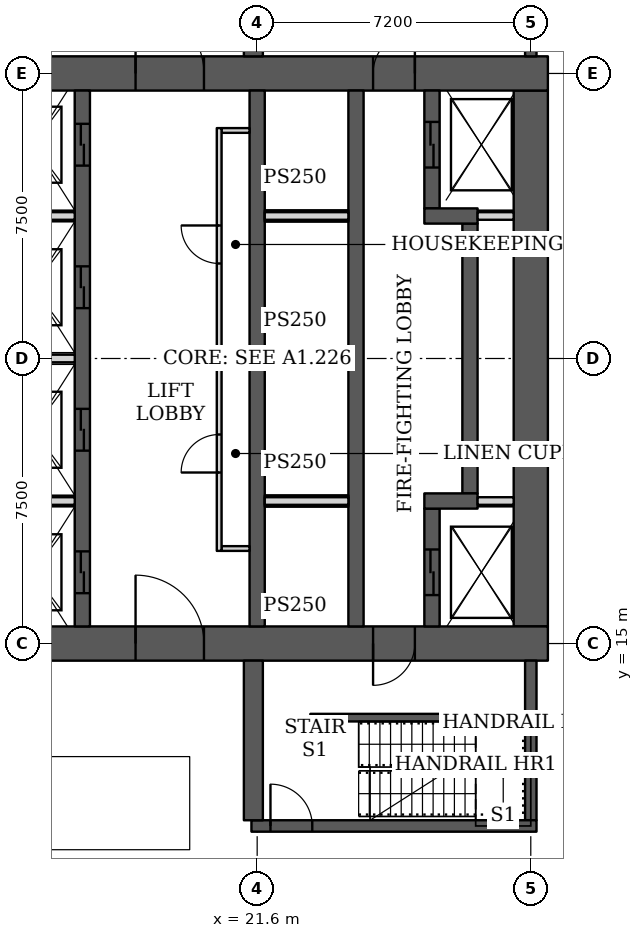
"""IFC4 building model, lengths in metres.
Left out: names, types, materials, properties, quantities, classifications, styles, units other than length and angle.
Written with IfcOpenShell. Run it as: python <this file> out.ifc"""

import sys

from ifc_helpers import new_model, si_unit, direction, frame, frame_2d, origin, place, context, subcontext, project, spatial, rectangle, extrude, element, fill, save


model = new_model("IFC4")
c1 = context("Model", 3, precision=1e-05, world=origin(), true_north=direction((0.0, 1.0)))
c2 = subcontext(c1, "Body", "Model", "MODEL_VIEW")
j1 = project(units=[si_unit("LENGTHUNIT", "METRE"), si_unit("PLANEANGLEUNIT", "RADIAN")], contexts=[c1])
p1 = place(None, origin())
s1 = spatial("IfcSite", under=j1, at=p1, CompositionType="ELEMENT")
p2 = place(p1, origin())
s2 = spatial("IfcBuilding", under=s1, at=p2, CompositionType="ELEMENT")
p3 = place(p2, frame((0.0, 0.0, -4.0)))
s3 = spatial("IfcBuildingStorey", under=s2, at=p3, CompositionType="ELEMENT", Elevation=-4.0)
p4 = place(p3, frame((13.95, 15.0, 0.0), z_axis=(0.0, 0.0, 1.0), x_axis=(1.0, 0.0, 0.0)))
e1 = element("IfcWall", 1, at=p4, inside=s3, PredefinedType="SHEAR", context=c2, shape_type="SweptSolid", body=[
    extrude(rectangle(XDim=15.3, YDim=0.9, at=frame_2d((7.65, 0.0))), origin(), (0.0, 0.0, 1.0), 4.0),
])
p5 = place(p4, frame((4.45, 0.0, 0.0)))
e2 = element("IfcOpeningElement", 2, at=p5, cuts=e1, PredefinedType="OPENING", context=c2, shape_type="SweptSolid", body=[
    extrude(rectangle(XDim=1.8, YDim=2.1, at=frame_2d((0.9, 1.05))), frame((0.0, 0.46, 0.0), z_axis=(0.0, -1.0, 0.0), x_axis=(1.0, 0.0, 0.0)), (0.0, 0.0, 1.0), 0.92),
])
p6 = place(p4, frame((10.7, 0.0, 0.0)))
e3 = element("IfcOpeningElement", 3, at=p6, cuts=e1, PredefinedType="OPENING", context=c2, shape_type="SweptSolid", body=[
    extrude(rectangle(XDim=1.1, YDim=2.1, at=frame_2d((0.55, 1.05))), frame((0.0, 0.46, 0.0), z_axis=(0.0, -1.0, 0.0), x_axis=(1.0, 0.0, 0.0)), (0.0, 0.0, 1.0), 0.92),
])
p7 = place(p3, frame((13.95, 30.0, 0.0), z_axis=(0.0, 0.0, 1.0), x_axis=(1.0, 0.0, 0.0)))
e4 = element("IfcWall", 4, at=p7, inside=s3, PredefinedType="SHEAR", context=c2, shape_type="SweptSolid", body=[
    extrude(rectangle(XDim=15.3, YDim=0.9, at=frame_2d((7.65, 0.0))), origin(), (0.0, 0.0, 1.0), 4.0),
])
p8 = place(p7, frame((4.45, 0.0, 0.0)))
e5 = element("IfcOpeningElement", 5, at=p8, cuts=e4, PredefinedType="OPENING", context=c2, shape_type="SweptSolid", body=[
    extrude(rectangle(XDim=1.8, YDim=2.1, at=frame_2d((0.9, 1.05))), frame((0.0, 0.46, 0.0), z_axis=(0.0, -1.0, 0.0), x_axis=(1.0, 0.0, 0.0)), (0.0, 0.0, 1.0), 0.92),
])
p9 = place(p7, frame((10.7, 0.0, 0.0)))
e6 = element("IfcOpeningElement", 6, at=p9, cuts=e4, PredefinedType="OPENING", context=c2, shape_type="SweptSolid", body=[
    extrude(rectangle(XDim=1.1, YDim=2.1, at=frame_2d((0.55, 1.05))), frame((0.0, 0.46, 0.0), z_axis=(0.0, -1.0, 0.0), x_axis=(1.0, 0.0, 0.0)), (0.0, 0.0, 1.0), 0.92),
])
p10 = place(p3, frame((28.8, 15.45, 0.0), z_axis=(0.0, 0.0, 1.0), x_axis=(0.0, 1.0, 0.0)))
e7 = element("IfcWall", 7, at=p10, inside=s3, PredefinedType="SHEAR", context=c2, shape_type="SweptSolid", body=[
    extrude(rectangle(XDim=14.1, YDim=0.9, at=frame_2d((7.05, 0.0))), origin(), (0.0, 0.0, 1.0), 4.0),
])
p11 = place(p3, frame((17.0, 15.45, 0.0), z_axis=(0.0, 0.0, 1.0), x_axis=(0.0, 1.0, 0.0)))
e8 = element("IfcWall", 8, at=p11, inside=s3, PredefinedType="SHEAR", context=c2, shape_type="SweptSolid", body=[
    extrude(rectangle(XDim=14.1, YDim=0.4, at=frame_2d((7.05, 0.0))), origin(), (0.0, 0.0, 1.0), 4.0),
])
p12 = place(p11, frame((0.875, 0.0, 0.0)))
e9 = element("IfcOpeningElement", 9, at=p12, cuts=e8, PredefinedType="OPENING", context=c2, shape_type="SweptSolid", body=[
    extrude(rectangle(XDim=1.1, YDim=2.1, at=frame_2d((0.55, 1.05))), frame((0.0, 0.21, 0.0), z_axis=(0.0, -1.0, 0.0), x_axis=(1.0, 0.0, 0.0)), (0.0, 0.0, 1.0), 0.42),
])
p13 = place(p11, frame((4.625, 0.0, 0.0)))
e10 = element("IfcOpeningElement", 10, at=p13, cuts=e8, PredefinedType="OPENING", context=c2, shape_type="SweptSolid", body=[
    extrude(rectangle(XDim=1.1, YDim=2.1, at=frame_2d((0.55, 1.05))), frame((0.0, 0.21, 0.0), z_axis=(0.0, -1.0, 0.0), x_axis=(1.0, 0.0, 0.0)), (0.0, 0.0, 1.0), 0.42),
])
p14 = place(p11, frame((8.375, 0.0, 0.0)))
e11 = element("IfcOpeningElement", 11, at=p14, cuts=e8, PredefinedType="OPENING", context=c2, shape_type="SweptSolid", body=[
    extrude(rectangle(XDim=1.1, YDim=2.1, at=frame_2d((0.55, 1.05))), frame((0.0, 0.21, 0.0), z_axis=(0.0, -1.0, 0.0), x_axis=(1.0, 0.0, 0.0)), (0.0, 0.0, 1.0), 0.42),
])
p15 = place(p11, frame((12.125, 0.0, 0.0)))
e12 = element("IfcOpeningElement", 12, at=p15, cuts=e8, PredefinedType="OPENING", context=c2, shape_type="SweptSolid", body=[
    extrude(rectangle(XDim=1.1, YDim=2.1, at=frame_2d((0.55, 1.05))), frame((0.0, 0.21, 0.0), z_axis=(0.0, -1.0, 0.0), x_axis=(1.0, 0.0, 0.0)), (0.0, 0.0, 1.0), 0.42),
])
for number, where, z_axis, x_axis in (
    (13, (21.6, 15.45, 0.0), (0.0, 0.0, 1.0), (0.0, 1.0, 0.0)),
    (14, (24.2, 15.45, 0.0), (0.0, 0.0, 1.0), (0.0, 1.0, 0.0)),
):
    element("IfcWall", number, at=place(p3, frame(where, z_axis=z_axis, x_axis=x_axis)), inside=s3, PredefinedType="SHEAR", context=c2, shape_type="SweptSolid", body=[
        extrude(rectangle(XDim=14.1, YDim=0.4, at=frame_2d((7.05, 0.0))), origin(), (0.0, 0.0, 1.0), 4.0),
    ])
p16 = place(p3, frame((26.2, 15.45, 0.0), z_axis=(0.0, 0.0, 1.0), x_axis=(0.0, 1.0, 0.0)))
e15 = element("IfcWall", 15, at=p16, inside=s3, PredefinedType="SHEAR", context=c2, shape_type="SweptSolid", body=[
    extrude(rectangle(XDim=3.1, YDim=0.4, at=frame_2d((1.55, 0.0))), origin(), (0.0, 0.0, 1.0), 4.0),
])
p17 = place(p16, frame((0.825, 0.0, 0.0)))
e16 = element("IfcOpeningElement", 16, at=p17, cuts=e15, PredefinedType="OPENING", context=c2, shape_type="SweptSolid", body=[
    extrude(rectangle(XDim=1.2, YDim=2.1, at=frame_2d((0.6, 1.05))), frame((0.0, 0.21, 0.0), z_axis=(0.0, -1.0, 0.0), x_axis=(1.0, 0.0, 0.0)), (0.0, 0.0, 1.0), 0.42),
])
p18 = place(p3, frame((26.0, 18.75, 0.0), z_axis=(0.0, 0.0, 1.0), x_axis=(1.0, 0.0, 0.0)))
e17 = element("IfcWall", 17, at=p18, inside=s3, PredefinedType="SHEAR", context=c2, shape_type="SweptSolid", body=[
    extrude(rectangle(XDim=1.4, YDim=0.4, at=frame_2d((0.7, 0.0))), origin(), (0.0, 0.0, 1.0), 4.0),
])
p19 = place(p3, frame((27.2, 18.95, 0.0), z_axis=(0.0, 0.0, 1.0), x_axis=(0.0, 1.0, 0.0)))
e18 = element("IfcWall", 18, at=p19, inside=s3, PredefinedType="SHEAR", context=c2, shape_type="SweptSolid", body=[
    extrude(rectangle(XDim=7.1, YDim=0.4, at=frame_2d((3.55, 0.0))), origin(), (0.0, 0.0, 1.0), 4.0),
])
p20 = place(p3, frame((26.0, 26.25, 0.0), z_axis=(0.0, 0.0, 1.0), x_axis=(1.0, 0.0, 0.0)))
e19 = element("IfcWall", 19, at=p20, inside=s3, PredefinedType="SHEAR", context=c2, shape_type="SweptSolid", body=[
    extrude(rectangle(XDim=1.4, YDim=0.4, at=frame_2d((0.7, 0.0))), origin(), (0.0, 0.0, 1.0), 4.0),
])
p21 = place(p3, frame((26.2, 26.45, 0.0), z_axis=(0.0, 0.0, 1.0), x_axis=(0.0, 1.0, 0.0)))
e20 = element("IfcWall", 20, at=p21, inside=s3, PredefinedType="SHEAR", context=c2, shape_type="SweptSolid", body=[
    extrude(rectangle(XDim=3.1, YDim=0.4, at=frame_2d((1.55, 0.0))), origin(), (0.0, 0.0, 1.0), 4.0),
])
p22 = place(p21, frame((1.075, 0.0, 0.0)))
e21 = element("IfcOpeningElement", 21, at=p22, cuts=e20, PredefinedType="OPENING", context=c2, shape_type="SweptSolid", body=[
    extrude(rectangle(XDim=1.2, YDim=2.1, at=frame_2d((0.6, 1.05))), frame((0.0, 0.21, 0.0), z_axis=(0.0, -1.0, 0.0), x_axis=(1.0, 0.0, 0.0)), (0.0, 0.0, 1.0), 0.42),
])
p23 = place(p3, frame((21.45, 10.2, 0.0), z_axis=(0.0, 0.0, 1.0), x_axis=(1.0, 0.0, 0.0)))
e22 = element("IfcWall", 22, at=p23, inside=s3, PredefinedType="SHEAR", context=c2, shape_type="SweptSolid", body=[
    extrude(rectangle(XDim=7.5, YDim=0.3, at=frame_2d((3.75, 0.0))), origin(), (0.0, 0.0, 1.0), 4.0),
])
p24 = place(p23, frame((0.5, 0.0, 0.0)))
e23 = element("IfcOpeningElement", 23, at=p24, cuts=e22, PredefinedType="OPENING", context=c2, shape_type="SweptSolid", body=[
    extrude(rectangle(XDim=1.1, YDim=2.1, at=frame_2d((0.55, 1.05))), frame((0.0, 0.16, 0.0), z_axis=(0.0, -1.0, 0.0), x_axis=(1.0, 0.0, 0.0)), (0.0, 0.0, 1.0), 0.32),
])
p25 = place(p3, frame((21.5, 10.35, 0.0), z_axis=(0.0, 0.0, 1.0), x_axis=(0.0, 1.0, 0.0)))
e24 = element("IfcWall", 24, at=p25, inside=s3, PredefinedType="SHEAR", context=c2, shape_type="SweptSolid", body=[
    extrude(rectangle(XDim=4.2, YDim=0.5, at=frame_2d((2.1, 0.0))), origin(), (0.0, 0.0, 1.0), 4.0),
])
p26 = place(p3, frame((28.8, 10.35, 0.0), z_axis=(0.0, 0.0, 1.0), x_axis=(0.0, 1.0, 0.0)))
e25 = element("IfcWall", 25, at=p26, inside=s3, PredefinedType="SHEAR", context=c2, shape_type="SweptSolid", body=[
    extrude(rectangle(XDim=4.2, YDim=0.3, at=frame_2d((2.1, 0.0))), origin(), (0.0, 0.0, 1.0), 4.0),
])
p27 = place(p3, frame((21.5, 30.45, 0.0), z_axis=(0.0, 0.0, 1.0), x_axis=(0.0, 1.0, 0.0)))
e26 = element("IfcWall", 26, at=p27, inside=s3, PredefinedType="SHEAR", context=c2, shape_type="SweptSolid", body=[
    extrude(rectangle(XDim=4.2, YDim=0.5, at=frame_2d((2.1, 0.0))), origin(), (0.0, 0.0, 1.0), 4.0),
])
p28 = place(p3, frame((28.8, 30.45, 0.0), z_axis=(0.0, 0.0, 1.0), x_axis=(0.0, 1.0, 0.0)))
e27 = element("IfcWall", 27, at=p28, inside=s3, PredefinedType="SHEAR", context=c2, shape_type="SweptSolid", body=[
    extrude(rectangle(XDim=4.2, YDim=0.3, at=frame_2d((2.1, 0.0))), origin(), (0.0, 0.0, 1.0), 4.0),
])
p29 = place(p3, frame((20.6, 17.438, 0.0), z_axis=(0.0, 0.0, 1.0), x_axis=(0.0, 1.0, 0.0)))
e28 = element("IfcWall", 28, at=p29, inside=s3, PredefinedType="PARTITIONING", context=c2, shape_type="SweptSolid", body=[
    extrude(rectangle(XDim=11.124, YDim=0.125, at=frame_2d((5.562, 0.0))), origin(), (0.0, 0.0, 1.0), 3.7),
])
p30 = place(p29, frame((2.062, 0.0, 0.0)))
e29 = element("IfcOpeningElement", 29, at=p30, cuts=e28, PredefinedType="OPENING", context=c2, shape_type="SweptSolid", body=[
    extrude(rectangle(XDim=1.0, YDim=2.1, at=frame_2d((0.5, 1.05))), frame((0.0, 0.073, 0.0), z_axis=(0.0, -1.0, 0.0), x_axis=(1.0, 0.0, 0.0)), (0.0, 0.0, 1.0), 0.145),
])
p31 = place(p29, frame((7.562, 0.0, 0.0)))
e30 = element("IfcOpeningElement", 30, at=p31, cuts=e28, PredefinedType="OPENING", context=c2, shape_type="SweptSolid", body=[
    extrude(rectangle(XDim=1.0, YDim=2.1, at=frame_2d((0.5, 1.05))), frame((0.0, 0.073, 0.0), z_axis=(0.0, -1.0, 0.0), x_axis=(1.0, 0.0, 0.0)), (0.0, 0.0, 1.0), 0.145),
])
for number, where, z_axis, x_axis in (
    (31, (20.663, 17.5, 0.0), (0.0, 0.0, 1.0), (1.0, 0.0, 0.0)),
    (32, (20.663, 28.5, 0.0), (0.0, 0.0, 1.0), (1.0, 0.0, 0.0)),
    (33, (20.663, 22.5, 0.0), (0.0, 0.0, 1.0), (1.0, 0.0, 0.0)),
):
    element("IfcWall", number, at=place(p3, frame(where, z_axis=z_axis, x_axis=x_axis)), inside=s3, PredefinedType="PARTITIONING", context=c2, shape_type="SweptSolid", body=[
        extrude(rectangle(XDim=0.737, YDim=0.125, at=frame_2d((0.368, 0.0))), origin(), (0.0, 0.0, 1.0), 3.7),
    ])
p32 = place(p3, frame((23.0, 13.05, 0.0), z_axis=(0.0, 0.0, 1.0), x_axis=(1.0, 0.0, 0.0)))
e34 = element("IfcWall", 34, at=p32, inside=s3, PredefinedType="SHEAR", context=c2, shape_type="SweptSolid", body=[
    extrude(rectangle(XDim=5.8, YDim=0.2, at=frame_2d((2.9, 0.0))), origin(), (0.0, 0.0, 1.0), 4.0),
])
p33 = place(p3, frame((14.85, 18.75, 0.0), z_axis=(0.0, 0.0, 1.0), x_axis=(1.0, 0.0, 0.0)))
e35 = element("IfcWall", 35, at=p33, inside=s3, PredefinedType="SOLIDWALL", context=c2, shape_type="SweptSolid", body=[
    extrude(rectangle(XDim=1.95, YDim=0.2, at=frame_2d((0.975, 0.0))), origin(), (0.0, 0.0, 1.0), 3.7),
])
p34 = place(p3, frame((21.8, 18.75, 0.0), z_axis=(0.0, 0.0, 1.0), x_axis=(1.0, 0.0, 0.0)))
e36 = element("IfcWall", 36, at=p34, inside=s3, PredefinedType="SHEAR", context=c2, shape_type="SweptSolid", body=[
    extrude(rectangle(XDim=2.2, YDim=0.3, at=frame_2d((1.1, 0.0))), origin(), (0.0, 0.0, 1.0), 2.4),
])
p35 = place(p3, frame((21.8, 18.75, 2.4), z_axis=(0.0, 0.0, 1.0), x_axis=(1.0, 0.0, 0.0)))
e37 = element("IfcWall", 37, at=p35, inside=s3, PredefinedType="SOLIDWALL", context=c2, shape_type="SweptSolid", body=[
    extrude(rectangle(XDim=2.2, YDim=0.2, at=frame_2d((1.1, 0.0))), origin(), (0.0, 0.0, 1.0), 1.3),
])
p36 = place(p3, frame((14.85, 22.5, 0.0), z_axis=(0.0, 0.0, 1.0), x_axis=(1.0, 0.0, 0.0)))
e38 = element("IfcWall", 38, at=p36, inside=s3, PredefinedType="SOLIDWALL", context=c2, shape_type="SweptSolid", body=[
    extrude(rectangle(XDim=1.95, YDim=0.2, at=frame_2d((0.975, 0.0))), origin(), (0.0, 0.0, 1.0), 3.7),
])
p37 = place(p3, frame((21.8, 22.5, 0.0), z_axis=(0.0, 0.0, 1.0), x_axis=(1.0, 0.0, 0.0)))
e39 = element("IfcWall", 39, at=p37, inside=s3, PredefinedType="SHEAR", context=c2, shape_type="SweptSolid", body=[
    extrude(rectangle(XDim=2.2, YDim=0.3, at=frame_2d((1.1, 0.0))), origin(), (0.0, 0.0, 1.0), 2.4),
])
p38 = place(p3, frame((21.8, 22.5, 2.4), z_axis=(0.0, 0.0, 1.0), x_axis=(1.0, 0.0, 0.0)))
e40 = element("IfcWall", 40, at=p38, inside=s3, PredefinedType="SOLIDWALL", context=c2, shape_type="SweptSolid", body=[
    extrude(rectangle(XDim=2.2, YDim=0.2, at=frame_2d((1.1, 0.0))), origin(), (0.0, 0.0, 1.0), 1.3),
])
p39 = place(p3, frame((14.85, 26.25, 0.0), z_axis=(0.0, 0.0, 1.0), x_axis=(1.0, 0.0, 0.0)))
e41 = element("IfcWall", 41, at=p39, inside=s3, PredefinedType="SOLIDWALL", context=c2, shape_type="SweptSolid", body=[
    extrude(rectangle(XDim=1.95, YDim=0.2, at=frame_2d((0.975, 0.0))), origin(), (0.0, 0.0, 1.0), 3.7),
])
p40 = place(p3, frame((21.8, 26.25, 0.0), z_axis=(0.0, 0.0, 1.0), x_axis=(1.0, 0.0, 0.0)))
e42 = element("IfcWall", 42, at=p40, inside=s3, PredefinedType="SHEAR", context=c2, shape_type="SweptSolid", body=[
    extrude(rectangle(XDim=2.2, YDim=0.3, at=frame_2d((1.1, 0.0))), origin(), (0.0, 0.0, 1.0), 2.4),
])
p41 = place(p3, frame((21.8, 26.25, 2.4), z_axis=(0.0, 0.0, 1.0), x_axis=(1.0, 0.0, 0.0)))
e43 = element("IfcWall", 43, at=p41, inside=s3, PredefinedType="SOLIDWALL", context=c2, shape_type="SweptSolid", body=[
    extrude(rectangle(XDim=2.2, YDim=0.2, at=frame_2d((1.1, 0.0))), origin(), (0.0, 0.0, 1.0), 1.3),
])
for number, where, z_axis, x_axis in (
    (44, (27.4, 18.75, 0.0), (0.0, 0.0, 1.0), (1.0, 0.0, 0.0)),
    (45, (27.4, 26.25, 0.0), (0.0, 0.0, 1.0), (1.0, 0.0, 0.0)),
):
    element("IfcWall", number, at=place(p3, frame(where, z_axis=z_axis, x_axis=x_axis)), inside=s3, PredefinedType="SOLIDWALL", context=c2, shape_type="SweptSolid", body=[
        extrude(rectangle(XDim=0.95, YDim=0.2, at=frame_2d((0.475, 0.0))), origin(), (0.0, 0.0, 1.0), 3.7),
    ])
p42 = place(p30, origin())
e46 = element("IfcDoor", 46, at=p42, inside=s3, OperationType="SINGLE_SWING_LEFT", PredefinedType="DOOR", context=c2, shape_type="SweptSolid", body=[
    extrude(rectangle(XDim=1.0, YDim=2.1, at=frame_2d((0.5, 1.05))), frame((0.0, 0.025, 0.0), z_axis=(0.0, -1.0, 0.0), x_axis=(1.0, 0.0, 0.0)), (0.0, 0.0, 1.0), 0.05),
])
fill(e29, e46)
p43 = place(p31, origin())
e47 = element("IfcDoor", 47, at=p43, inside=s3, OperationType="SINGLE_SWING_RIGHT", PredefinedType="DOOR", context=c2, shape_type="SweptSolid", body=[
    extrude(rectangle(XDim=1.0, YDim=2.1, at=frame_2d((0.5, 1.05))), frame((0.0, 0.025, 0.0), z_axis=(0.0, -1.0, 0.0), x_axis=(1.0, 0.0, 0.0)), (0.0, 0.0, 1.0), 0.05),
])
fill(e30, e47)
p44 = place(p5, origin())
e48 = element("IfcDoor", 48, at=p44, inside=s3, OperationType="DOUBLE_DOOR_SINGLE_SWING", PredefinedType="DOOR", context=c2, shape_type="SweptSolid", body=[
    extrude(rectangle(XDim=1.8, YDim=2.1, at=frame_2d((0.9, 1.05))), frame((0.0, 0.025, 0.0), z_axis=(0.0, -1.0, 0.0), x_axis=(1.0, 0.0, 0.0)), (0.0, 0.0, 1.0), 0.05),
])
fill(e2, e48)
p45 = place(p6, origin())
e49 = element("IfcDoor", 49, at=p45, inside=s3, OperationType="SINGLE_SWING_RIGHT", PredefinedType="DOOR", context=c2, shape_type="SweptSolid", body=[
    extrude(rectangle(XDim=1.1, YDim=2.1, at=frame_2d((0.55, 1.05))), frame((0.0, 0.025, 0.0), z_axis=(0.0, -1.0, 0.0), x_axis=(1.0, 0.0, 0.0)), (0.0, 0.0, 1.0), 0.05),
])
fill(e3, e49)
p46 = place(p8, origin())
e50 = element("IfcDoor", 50, at=p46, inside=s3, OperationType="DOUBLE_DOOR_SINGLE_SWING", PredefinedType="DOOR", context=c2, shape_type="SweptSolid", body=[
    extrude(rectangle(XDim=1.8, YDim=2.1, at=frame_2d((0.9, 1.05))), frame((0.0, 0.025, 0.0), z_axis=(0.0, -1.0, 0.0), x_axis=(1.0, 0.0, 0.0)), (0.0, 0.0, 1.0), 0.05),
])
fill(e5, e50)
p47 = place(p9, origin())
e51 = element("IfcDoor", 51, at=p47, inside=s3, OperationType="SINGLE_SWING_RIGHT", PredefinedType="DOOR", context=c2, shape_type="SweptSolid", body=[
    extrude(rectangle(XDim=1.1, YDim=2.1, at=frame_2d((0.55, 1.05))), frame((0.0, 0.025, 0.0), z_axis=(0.0, -1.0, 0.0), x_axis=(1.0, 0.0, 0.0)), (0.0, 0.0, 1.0), 0.05),
])
fill(e6, e51)
p48 = place(p17, origin())
e52 = element("IfcDoor", 52, at=p48, inside=s3, OperationType="DOUBLE_DOOR_SLIDING", PredefinedType="DOOR", context=c2, shape_type="SweptSolid", body=[
    extrude(rectangle(XDim=1.2, YDim=2.1, at=frame_2d((0.6, 1.05))), frame((0.0, 0.025, 0.0), z_axis=(0.0, -1.0, 0.0), x_axis=(1.0, 0.0, 0.0)), (0.0, 0.0, 1.0), 0.05),
])
fill(e16, e52)
p49 = place(p22, origin())
e53 = element("IfcDoor", 53, at=p49, inside=s3, OperationType="DOUBLE_DOOR_SLIDING", PredefinedType="DOOR", context=c2, shape_type="SweptSolid", body=[
    extrude(rectangle(XDim=1.2, YDim=2.1, at=frame_2d((0.6, 1.05))), frame((0.0, 0.025, 0.0), z_axis=(0.0, -1.0, 0.0), x_axis=(1.0, 0.0, 0.0)), (0.0, 0.0, 1.0), 0.05),
])
fill(e21, e53)
p50 = place(p12, origin())
e54 = element("IfcDoor", 54, at=p50, inside=s3, OperationType="DOUBLE_DOOR_SLIDING", PredefinedType="DOOR", context=c2, shape_type="SweptSolid", body=[
    extrude(rectangle(XDim=1.1, YDim=2.1, at=frame_2d((0.55, 1.05))), frame((0.0, 0.025, 0.0), z_axis=(0.0, -1.0, 0.0), x_axis=(1.0, 0.0, 0.0)), (0.0, 0.0, 1.0), 0.05),
])
fill(e9, e54)
p51 = place(p13, origin())
e55 = element("IfcDoor", 55, at=p51, inside=s3, OperationType="DOUBLE_DOOR_SLIDING", PredefinedType="DOOR", context=c2, shape_type="SweptSolid", body=[
    extrude(rectangle(XDim=1.1, YDim=2.1, at=frame_2d((0.55, 1.05))), frame((0.0, 0.025, 0.0), z_axis=(0.0, -1.0, 0.0), x_axis=(1.0, 0.0, 0.0)), (0.0, 0.0, 1.0), 0.05),
])
fill(e10, e55)
p52 = place(p14, origin())
e56 = element("IfcDoor", 56, at=p52, inside=s3, OperationType="DOUBLE_DOOR_SLIDING", PredefinedType="DOOR", context=c2, shape_type="SweptSolid", body=[
    extrude(rectangle(XDim=1.1, YDim=2.1, at=frame_2d((0.55, 1.05))), frame((0.0, 0.025, 0.0), z_axis=(0.0, -1.0, 0.0), x_axis=(1.0, 0.0, 0.0)), (0.0, 0.0, 1.0), 0.05),
])
fill(e11, e56)
p53 = place(p15, origin())
e57 = element("IfcDoor", 57, at=p53, inside=s3, OperationType="DOUBLE_DOOR_SLIDING", PredefinedType="DOOR", context=c2, shape_type="SweptSolid", body=[
    extrude(rectangle(XDim=1.1, YDim=2.1, at=frame_2d((0.55, 1.05))), frame((0.0, 0.025, 0.0), z_axis=(0.0, -1.0, 0.0), x_axis=(1.0, 0.0, 0.0)), (0.0, 0.0, 1.0), 0.05),
])
fill(e12, e57)
p54 = place(p24, origin())
e58 = element("IfcDoor", 58, at=p54, inside=s3, OperationType="SINGLE_SWING_LEFT", PredefinedType="DOOR", context=c2, shape_type="SweptSolid", body=[
    extrude(rectangle(XDim=1.1, YDim=2.1, at=frame_2d((0.55, 1.05))), frame((0.0, 0.025, 0.0), z_axis=(0.0, -1.0, 0.0), x_axis=(1.0, 0.0, 0.0)), (0.0, 0.0, 1.0), 0.05),
])
fill(e23, e58)
save(model, sys.argv[1])
